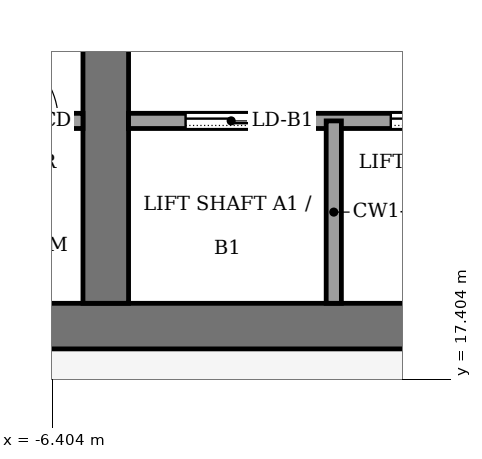
"""IFC4 building model, lengths in metres.
Left out: names, types, materials, properties, quantities, classifications, styles, units other than length and angle.
Written with IfcOpenShell. Run it as: python <this file> out.ifc"""

import sys

from ifc_helpers import new_model, si_unit, direction, frame, frame_2d, origin, place, context, subcontext, project, spatial, rectangle, extrude, element, fill, save


model = new_model("IFC4")
c1 = context("Model", 3, precision=1e-05, world=origin(), true_north=direction((0.0, 1.0)))
c2 = subcontext(c1, "Body", "Model", "MODEL_VIEW")
j1 = project(units=[si_unit("LENGTHUNIT", "METRE"), si_unit("PLANEANGLEUNIT", "RADIAN")], contexts=[c1])
p1 = place(None, origin())
s1 = spatial("IfcSite", under=j1, at=p1, CompositionType="ELEMENT")
p2 = place(p1, origin())
s2 = spatial("IfcBuilding", under=s1, at=p2, CompositionType="ELEMENT")
p3 = place(p2, frame((0.0, 0.0, 298.0)))
s3 = spatial("IfcBuildingStorey", under=s2, at=p3, CompositionType="ELEMENT", Elevation=298.0)
p4 = place(p3, frame((-13.2, 18.1, -0.13), z_axis=(0.0, 0.0, 1.0), x_axis=(1.0, 0.0, 0.0)))
e1 = element("IfcWall", 1, at=p4, inside=s3, PredefinedType="SHEAR", context=c2, shape_type="SweptSolid", body=[
    extrude(rectangle(XDim=26.4, YDim=0.6, at=frame_2d((13.2, 0.0))), origin(), (0.0, 0.0, 1.0), 4.0),
])
p5 = place(p3, frame((-5.7, 18.4, -0.13), z_axis=(0.0, 0.0, 1.0), x_axis=(0.0, 1.0, 0.0)))
e2 = element("IfcWall", 2, at=p5, inside=s3, PredefinedType="SHEAR", context=c2, shape_type="SweptSolid", body=[
    extrude(rectangle(XDim=19.2, YDim=0.6, at=frame_2d((9.6, 0.0))), origin(), (0.0, 0.0, 1.0), 4.0),
])
p6 = place(p5, frame((8.35, 0.0, 0.13)))
e3 = element("IfcOpeningElement", 3, at=p6, cuts=e2, PredefinedType="OPENING", context=c2, shape_type="SweptSolid", body=[
    extrude(rectangle(XDim=0.9, YDim=2.1, at=frame_2d((0.45, 1.05))), frame((0.0, 0.31, 0.0), z_axis=(0.0, -1.0, 0.0), x_axis=(1.0, 0.0, 0.0)), (0.0, 0.0, 1.0), 0.62),
])
p7 = place(p3, frame((-12.6, 20.8, 0.0), z_axis=(0.0, 0.0, 1.0), x_axis=(1.0, 0.0, 0.0)))
e4 = element("IfcWall", 4, at=p7, inside=s3, PredefinedType="PARTITIONING", context=c2, shape_type="SweptSolid", body=[
    extrude(rectangle(XDim=6.6, YDim=0.2, at=frame_2d((3.3, 0.0))), origin(), (0.0, 0.0, 1.0), 3.87),
])
p8 = place(p7, frame((0.325, 0.0, 0.0)))
e5 = element("IfcOpeningElement", 5, at=p8, cuts=e4, PredefinedType="OPENING", context=c2, shape_type="SweptSolid", body=[
    extrude(rectangle(XDim=1.0, YDim=2.1, at=frame_2d((0.5, 1.05))), frame((0.0, 0.11, 0.0), z_axis=(0.0, -1.0, 0.0), x_axis=(1.0, 0.0, 0.0)), (0.0, 0.0, 1.0), 0.22),
])
p9 = place(p7, frame((1.975, 0.0, 0.0)))
e6 = element("IfcOpeningElement", 6, at=p9, cuts=e4, PredefinedType="OPENING", context=c2, shape_type="SweptSolid", body=[
    extrude(rectangle(XDim=1.0, YDim=2.1, at=frame_2d((0.5, 1.05))), frame((0.0, 0.11, 0.0), z_axis=(0.0, -1.0, 0.0), x_axis=(1.0, 0.0, 0.0)), (0.0, 0.0, 1.0), 0.22),
])
p10 = place(p7, frame((3.625, 0.0, 0.0)))
e7 = element("IfcOpeningElement", 7, at=p10, cuts=e4, PredefinedType="OPENING", context=c2, shape_type="SweptSolid", body=[
    extrude(rectangle(XDim=1.0, YDim=2.1, at=frame_2d((0.5, 1.05))), frame((0.0, 0.11, 0.0), z_axis=(0.0, -1.0, 0.0), x_axis=(1.0, 0.0, 0.0)), (0.0, 0.0, 1.0), 0.22),
])
p11 = place(p7, frame((5.275, 0.0, 0.0)))
e8 = element("IfcOpeningElement", 8, at=p11, cuts=e4, PredefinedType="OPENING", context=c2, shape_type="SweptSolid", body=[
    extrude(rectangle(XDim=1.0, YDim=2.1, at=frame_2d((0.5, 1.05))), frame((0.0, 0.11, 0.0), z_axis=(0.0, -1.0, 0.0), x_axis=(1.0, 0.0, 0.0)), (0.0, 0.0, 1.0), 0.22),
])
p12 = place(p3, frame((-5.4, 20.8, 0.0), z_axis=(0.0, 0.0, 1.0), x_axis=(1.0, 0.0, 0.0)))
e9 = element("IfcWall", 9, at=p12, inside=s3, PredefinedType="PARTITIONING", context=c2, shape_type="SweptSolid", body=[
    extrude(rectangle(XDim=10.8, YDim=0.2, at=frame_2d((5.4, 0.0))), origin(), (0.0, 0.0, 1.0), 3.87),
])
p13 = place(p12, frame((0.75, 0.0, 0.0)))
e10 = element("IfcOpeningElement", 10, at=p13, cuts=e9, PredefinedType="OPENING", context=c2, shape_type="SweptSolid", body=[
    extrude(rectangle(XDim=1.2, YDim=2.2, at=frame_2d((0.6, 1.1))), frame((0.0, 0.11, 0.0), z_axis=(0.0, -1.0, 0.0), x_axis=(1.0, 0.0, 0.0)), (0.0, 0.0, 1.0), 0.22),
])
p14 = place(p12, frame((3.45, 0.0, 0.0)))
e11 = element("IfcOpeningElement", 11, at=p14, cuts=e9, PredefinedType="OPENING", context=c2, shape_type="SweptSolid", body=[
    extrude(rectangle(XDim=1.2, YDim=2.2, at=frame_2d((0.6, 1.1))), frame((0.0, 0.11, 0.0), z_axis=(0.0, -1.0, 0.0), x_axis=(1.0, 0.0, 0.0)), (0.0, 0.0, 1.0), 0.22),
])
p15 = place(p12, frame((6.15, 0.0, 0.0)))
e12 = element("IfcOpeningElement", 12, at=p15, cuts=e9, PredefinedType="OPENING", context=c2, shape_type="SweptSolid", body=[
    extrude(rectangle(XDim=1.2, YDim=2.2, at=frame_2d((0.6, 1.1))), frame((0.0, 0.11, 0.0), z_axis=(0.0, -1.0, 0.0), x_axis=(1.0, 0.0, 0.0)), (0.0, 0.0, 1.0), 0.22),
])
p16 = place(p12, frame((8.85, 0.0, 0.0)))
e13 = element("IfcOpeningElement", 13, at=p16, cuts=e9, PredefinedType="OPENING", context=c2, shape_type="SweptSolid", body=[
    extrude(rectangle(XDim=1.2, YDim=2.2, at=frame_2d((0.6, 1.1))), frame((0.0, 0.11, 0.0), z_axis=(0.0, -1.0, 0.0), x_axis=(1.0, 0.0, 0.0)), (0.0, 0.0, 1.0), 0.22),
])
p17 = place(p3, frame((-2.7, 18.4, 0.0), z_axis=(0.0, 0.0, 1.0), x_axis=(0.0, 1.0, 0.0)))
e14 = element("IfcWall", 14, at=p17, inside=s3, PredefinedType="PARTITIONING", context=c2, shape_type="SweptSolid", body=[
    extrude(rectangle(XDim=2.4, YDim=0.2, at=frame_2d((1.2, 0.0))), origin(), (0.0, 0.0, 1.0), 3.87),
])
p18 = place(p13, origin())
e15 = element("IfcDoor", 15, at=p18, inside=s3, OperationType="SLIDING_TO_LEFT", PredefinedType="DOOR", context=c2, shape_type="SweptSolid", body=[
    extrude(rectangle(XDim=1.2, YDim=2.2, at=frame_2d((0.6, 1.1))), frame((0.0, 0.025, 0.0), z_axis=(0.0, -1.0, 0.0), x_axis=(1.0, 0.0, 0.0)), (0.0, 0.0, 1.0), 0.05),
])
fill(e10, e15)
p19 = place(p14, origin())
e16 = element("IfcDoor", 16, at=p19, inside=s3, OperationType="SLIDING_TO_LEFT", PredefinedType="DOOR", context=c2, shape_type="SweptSolid", body=[
    extrude(rectangle(XDim=1.2, YDim=2.2, at=frame_2d((0.6, 1.1))), frame((0.0, 0.025, 0.0), z_axis=(0.0, -1.0, 0.0), x_axis=(1.0, 0.0, 0.0)), (0.0, 0.0, 1.0), 0.05),
])
fill(e11, e16)
p20 = place(p11, origin())
e17 = element("IfcDoor", 17, at=p20, inside=s3, OperationType="SINGLE_SWING_LEFT", PredefinedType="DOOR", context=c2, shape_type="SweptSolid", body=[
    extrude(rectangle(XDim=1.0, YDim=2.1, at=frame_2d((0.5, 1.05))), frame((0.0, 0.025, 0.0), z_axis=(0.0, -1.0, 0.0), x_axis=(1.0, 0.0, 0.0)), (0.0, 0.0, 1.0), 0.05),
])
fill(e8, e17)
save(model, sys.argv[1])
